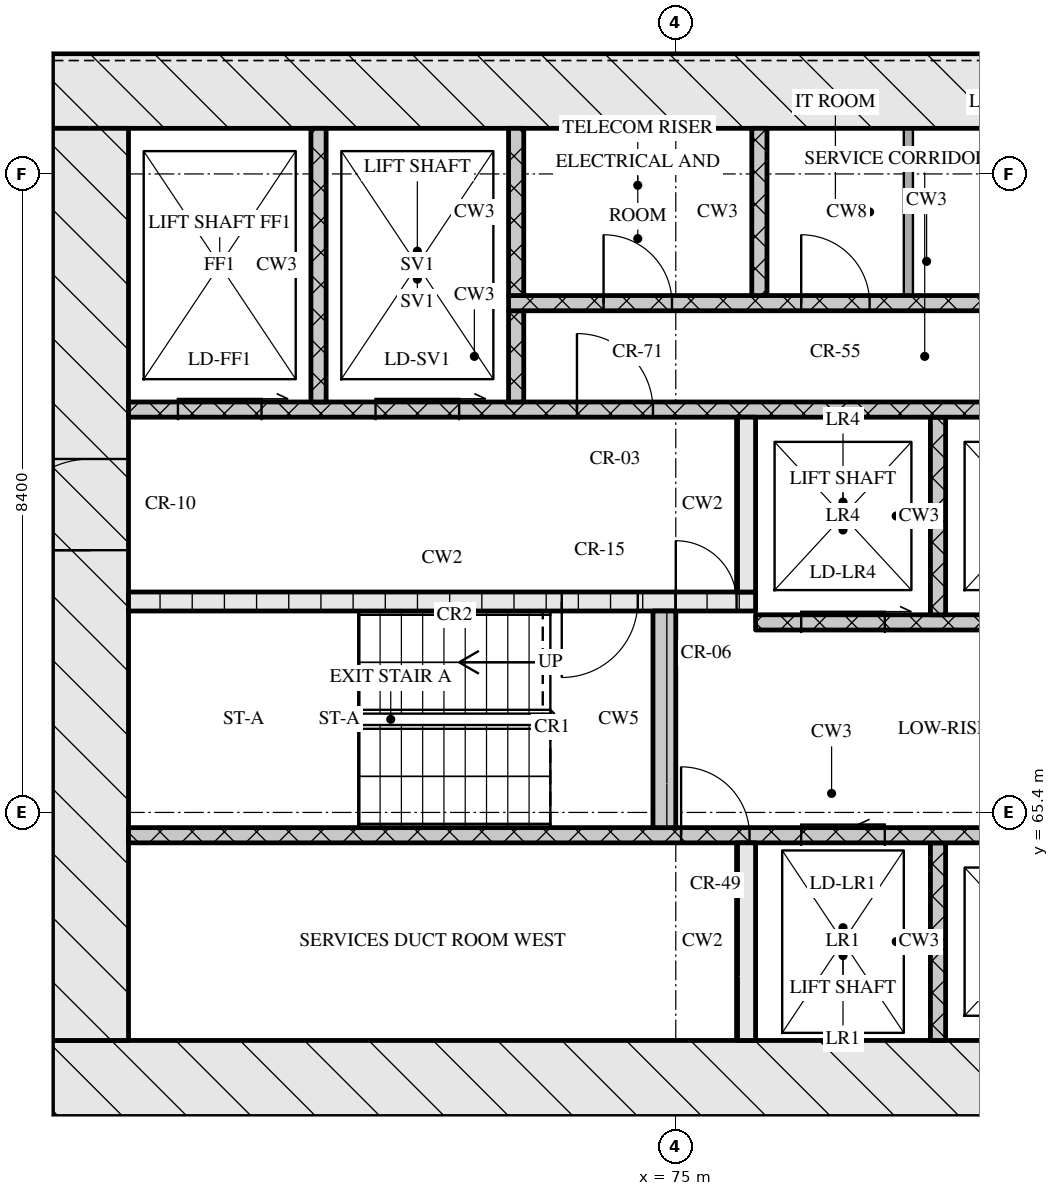
"""IFC4 building model, lengths in metres.
Left out: names, types, materials, properties, quantities, classifications, styles, units other than length and angle.
Written with IfcOpenShell. Run it as: python <this file> out.ifc"""

import sys

from ifc_helpers import new_model, si_unit, direction, frame, frame_2d, origin, place, context, subcontext, project, spatial, rectangle, extrude, element, fill, save


model = new_model("IFC4")
c1 = context("Model", 3, precision=1e-05, world=origin(), true_north=direction((0.0, 1.0)))
c2 = subcontext(c1, "Body", "Model", "MODEL_VIEW")
j1 = project(units=[si_unit("LENGTHUNIT", "METRE"), si_unit("PLANEANGLEUNIT", "RADIAN")], contexts=[c1])
p1 = place(None, origin())
s1 = spatial("IfcSite", under=j1, at=p1, CompositionType="ELEMENT")
p2 = place(p1, origin())
s2 = spatial("IfcBuilding", under=s1, at=p2, CompositionType="ELEMENT")
p3 = place(p2, frame((0.0, 0.0, 138.45)))
s3 = spatial("IfcBuildingStorey", under=s2, at=p3, CompositionType="ELEMENT", Elevation=138.45)
p4 = place(p3, frame((66.8, 61.9, 0.0), z_axis=(0.0, 0.0, 1.0), x_axis=(1.0, 0.0, 0.0)))
e1 = element("IfcWall", 1, at=p4, inside=s3, PredefinedType="SOLIDWALL", context=c2, shape_type="SweptSolid", body=[
    extrude(rectangle(XDim=41.6, YDim=1.0, at=frame_2d((20.8, 0.0))), origin(), (0.0, 0.0, 1.0), 3.3),
])
p5 = place(p4, frame((21.15, 0.0, 0.0)))
e2 = element("IfcOpeningElement", 2, at=p5, cuts=e1, PredefinedType="OPENING", context=c2, shape_type="SweptSolid", body=[
    extrude(rectangle(XDim=1.8, YDim=2.1, at=frame_2d((0.9, 1.05))), frame((0.0, 0.51, 0.0), z_axis=(0.0, -1.0, 0.0), x_axis=(1.0, 0.0, 0.0)), (0.0, 0.0, 1.0), 1.02),
])
p6 = place(p3, frame((66.8, 74.9, 0.0), z_axis=(0.0, 0.0, 1.0), x_axis=(1.0, 0.0, 0.0)))
e3 = element("IfcWall", 3, at=p6, inside=s3, PredefinedType="SOLIDWALL", context=c2, shape_type="SweptSolid", body=[
    extrude(rectangle(XDim=41.6, YDim=1.0, at=frame_2d((20.8, 0.0))), origin(), (0.0, 0.0, 1.0), 3.3),
])
p7 = place(p3, frame((67.3, 62.4, 0.0), z_axis=(0.0, 0.0, 1.0), x_axis=(0.0, 1.0, 0.0)))
e4 = element("IfcWall", 4, at=p7, inside=s3, PredefinedType="SOLIDWALL", context=c2, shape_type="SweptSolid", body=[
    extrude(rectangle(XDim=12.0, YDim=1.0, at=frame_2d((6.0, 0.0))), origin(), (0.0, 0.0, 1.0), 3.3),
])
p8 = place(p7, frame((6.45, 0.0, 0.0)))
e5 = element("IfcOpeningElement", 5, at=p8, cuts=e4, PredefinedType="OPENING", context=c2, shape_type="SweptSolid", body=[
    extrude(rectangle(XDim=1.2, YDim=2.1, at=frame_2d((0.6, 1.05))), frame((0.0, 0.51, 0.0), z_axis=(0.0, -1.0, 0.0), x_axis=(1.0, 0.0, 0.0)), (0.0, 0.0, 1.0), 1.02),
])
p9 = place(p3, frame((75.925, 62.4, 0.0), z_axis=(0.0, 0.0, 1.0), x_axis=(0.0, 1.0, 0.0)))
e6 = element("IfcWall", 6, at=p9, inside=s3, PredefinedType="SOLIDWALL", context=c2, shape_type="SweptSolid", body=[
    extrude(rectangle(XDim=2.6, YDim=0.25, at=frame_2d((1.3, 0.0))), origin(), (0.0, 0.0, 1.0), 3.3),
])
p10 = place(p3, frame((78.45, 62.4, 0.0), z_axis=(0.0, 0.0, 1.0), x_axis=(0.0, 1.0, 0.0)))
e7 = element("IfcWall", 7, at=p10, inside=s3, PredefinedType="SOLIDWALL", context=c2, shape_type="SweptSolid", body=[
    extrude(rectangle(XDim=2.6, YDim=0.2, at=frame_2d((1.3, 0.0))), origin(), (0.0, 0.0, 1.0), 3.3),
])
p11 = place(p3, frame((67.8, 65.1, 0.0), z_axis=(0.0, 0.0, 1.0), x_axis=(1.0, 0.0, 0.0)))
e8 = element("IfcWall", 8, at=p11, inside=s3, PredefinedType="SOLIDWALL", context=c2, shape_type="SweptSolid", body=[
    extrude(rectangle(XDim=18.5, YDim=0.2, at=frame_2d((9.25, 0.0))), origin(), (0.0, 0.0, 1.0), 3.3),
])
p12 = place(p11, frame((7.27, 0.0, 0.0)))
e9 = element("IfcOpeningElement", 9, at=p12, cuts=e8, PredefinedType="OPENING", context=c2, shape_type="SweptSolid", body=[
    extrude(rectangle(XDim=0.9, YDim=2.1, at=frame_2d((0.45, 1.05))), frame((0.0, 0.11, 0.0), z_axis=(0.0, -1.0, 0.0), x_axis=(1.0, 0.0, 0.0)), (0.0, 0.0, 1.0), 0.22),
])
p13 = place(p11, frame((8.85, 0.0, 0.0)))
e10 = element("IfcOpeningElement", 10, at=p13, cuts=e8, PredefinedType="OPENING", context=c2, shape_type="SweptSolid", body=[
    extrude(rectangle(XDim=1.1, YDim=2.1, at=frame_2d((0.55, 1.05))), frame((0.0, 0.11, 0.0), z_axis=(0.0, -1.0, 0.0), x_axis=(1.0, 0.0, 0.0)), (0.0, 0.0, 1.0), 0.22),
])
p14 = place(p11, frame((11.35, 0.0, 0.0)))
e11 = element("IfcOpeningElement", 11, at=p14, cuts=e8, PredefinedType="OPENING", context=c2, shape_type="SweptSolid", body=[
    extrude(rectangle(XDim=1.1, YDim=2.1, at=frame_2d((0.55, 1.05))), frame((0.0, 0.11, 0.0), z_axis=(0.0, -1.0, 0.0), x_axis=(1.0, 0.0, 0.0)), (0.0, 0.0, 1.0), 0.22),
])
p15 = place(p11, frame((13.85, 0.0, 0.0)))
e12 = element("IfcOpeningElement", 12, at=p15, cuts=e8, PredefinedType="OPENING", context=c2, shape_type="SweptSolid", body=[
    extrude(rectangle(XDim=1.1, YDim=2.1, at=frame_2d((0.55, 1.05))), frame((0.0, 0.11, 0.0), z_axis=(0.0, -1.0, 0.0), x_axis=(1.0, 0.0, 0.0)), (0.0, 0.0, 1.0), 0.22),
])
p16 = place(p11, frame((16.7, 0.0, 0.0)))
e13 = element("IfcOpeningElement", 13, at=p16, cuts=e8, PredefinedType="OPENING", context=c2, shape_type="SweptSolid", body=[
    extrude(rectangle(XDim=0.9, YDim=2.1, at=frame_2d((0.45, 1.05))), frame((0.0, 0.11, 0.0), z_axis=(0.0, -1.0, 0.0), x_axis=(1.0, 0.0, 0.0)), (0.0, 0.0, 1.0), 0.22),
])
p17 = place(p3, frame((74.85, 65.2, 0.0), z_axis=(0.0, 0.0, 1.0), x_axis=(0.0, 1.0, 0.0)))
e14 = element("IfcWall", 14, at=p17, inside=s3, PredefinedType="SOLIDWALL", context=c2, shape_type="SweptSolid", body=[
    extrude(rectangle(XDim=2.85, YDim=0.3, at=frame_2d((1.425, 0.0))), origin(), (0.0, 0.0, 1.0), 3.3),
])
p18 = place(p3, frame((76.05, 67.9, 0.0), z_axis=(0.0, 0.0, 1.0), x_axis=(1.0, 0.0, 0.0)))
e15 = element("IfcWall", 15, at=p18, inside=s3, PredefinedType="SOLIDWALL", context=c2, shape_type="SweptSolid", body=[
    extrude(rectangle(XDim=23.1, YDim=0.2, at=frame_2d((11.55, 0.0))), origin(), (0.0, 0.0, 1.0), 3.3),
])
p19 = place(p18, frame((0.6, 0.0, 0.0)))
e16 = element("IfcOpeningElement", 16, at=p19, cuts=e15, PredefinedType="OPENING", context=c2, shape_type="SweptSolid", body=[
    extrude(rectangle(XDim=1.1, YDim=2.1, at=frame_2d((0.55, 1.05))), frame((0.0, 0.11, 0.0), z_axis=(0.0, -1.0, 0.0), x_axis=(1.0, 0.0, 0.0)), (0.0, 0.0, 1.0), 0.22),
])
p20 = place(p18, frame((3.1, 0.0, 0.0)))
e17 = element("IfcOpeningElement", 17, at=p20, cuts=e15, PredefinedType="OPENING", context=c2, shape_type="SweptSolid", body=[
    extrude(rectangle(XDim=1.1, YDim=2.1, at=frame_2d((0.55, 1.05))), frame((0.0, 0.11, 0.0), z_axis=(0.0, -1.0, 0.0), x_axis=(1.0, 0.0, 0.0)), (0.0, 0.0, 1.0), 0.22),
])
p21 = place(p18, frame((5.6, 0.0, 0.0)))
e18 = element("IfcOpeningElement", 18, at=p21, cuts=e15, PredefinedType="OPENING", context=c2, shape_type="SweptSolid", body=[
    extrude(rectangle(XDim=1.1, YDim=2.1, at=frame_2d((0.55, 1.05))), frame((0.0, 0.11, 0.0), z_axis=(0.0, -1.0, 0.0), x_axis=(1.0, 0.0, 0.0)), (0.0, 0.0, 1.0), 0.22),
])
p22 = place(p18, frame((9.7, 0.0, 0.0)))
e19 = element("IfcOpeningElement", 19, at=p22, cuts=e15, PredefinedType="OPENING", context=c2, shape_type="SweptSolid", body=[
    extrude(rectangle(XDim=0.9, YDim=2.1, at=frame_2d((0.45, 1.05))), frame((0.0, 0.11, 0.0), z_axis=(0.0, -1.0, 0.0), x_axis=(1.0, 0.0, 0.0)), (0.0, 0.0, 1.0), 0.22),
])
p23 = place(p18, frame((13.55, 0.0, 0.0)))
e20 = element("IfcOpeningElement", 20, at=p23, cuts=e15, PredefinedType="OPENING", context=c2, shape_type="SweptSolid", body=[
    extrude(rectangle(XDim=1.0, YDim=2.1, at=frame_2d((0.5, 1.05))), frame((0.0, 0.11, 0.0), z_axis=(0.0, -1.0, 0.0), x_axis=(1.0, 0.0, 0.0)), (0.0, 0.0, 1.0), 0.22),
])
p24 = place(p3, frame((78.45, 68.0, 0.0), z_axis=(0.0, 0.0, 1.0), x_axis=(0.0, 1.0, 0.0)))
e21 = element("IfcWall", 21, at=p24, inside=s3, PredefinedType="SOLIDWALL", context=c2, shape_type="SweptSolid", body=[
    extrude(rectangle(XDim=2.6, YDim=0.2, at=frame_2d((1.3, 0.0))), origin(), (0.0, 0.0, 1.0), 3.3),
])
p25 = place(p3, frame((67.8, 68.175, 0.0), z_axis=(0.0, 0.0, 1.0), x_axis=(1.0, 0.0, 0.0)))
e22 = element("IfcWall", 22, at=p25, inside=s3, PredefinedType="SOLIDWALL", context=c2, shape_type="SweptSolid", body=[
    extrude(rectangle(XDim=8.25, YDim=0.25, at=frame_2d((4.125, 0.0))), origin(), (0.0, 0.0, 1.0), 3.3),
])
p26 = place(p25, frame((5.7, 0.0, 0.0)))
e23 = element("IfcOpeningElement", 23, at=p26, cuts=e22, PredefinedType="OPENING", context=c2, shape_type="SweptSolid", body=[
    extrude(rectangle(XDim=1.0, YDim=2.1, at=frame_2d((0.5, 1.05))), frame((0.0, 0.135, 0.0), z_axis=(0.0, -1.0, 0.0), x_axis=(1.0, 0.0, 0.0)), (0.0, 0.0, 1.0), 0.27),
])
p27 = place(p25, frame((7.2, 0.0, 0.0)))
e24 = element("IfcOpeningElement", 24, at=p27, cuts=e22, PredefinedType="OPENING", context=c2, shape_type="SweptSolid", body=[
    extrude(rectangle(XDim=0.8, YDim=2.1, at=frame_2d((0.4, 1.05))), frame((0.0, 0.135, 0.0), z_axis=(0.0, -1.0, 0.0), x_axis=(1.0, 0.0, 0.0)), (0.0, 0.0, 1.0), 0.27),
])
p28 = place(p3, frame((75.925, 68.3, 0.0), z_axis=(0.0, 0.0, 1.0), x_axis=(0.0, 1.0, 0.0)))
e25 = element("IfcWall", 25, at=p28, inside=s3, PredefinedType="SOLIDWALL", context=c2, shape_type="SweptSolid", body=[
    extrude(rectangle(XDim=2.3, YDim=0.25, at=frame_2d((1.15, 0.0))), origin(), (0.0, 0.0, 1.0), 3.3),
])
p29 = place(p3, frame((67.8, 70.7, 0.0), z_axis=(0.0, 0.0, 1.0), x_axis=(1.0, 0.0, 0.0)))
e26 = element("IfcWall", 26, at=p29, inside=s3, PredefinedType="SOLIDWALL", context=c2, shape_type="SweptSolid", body=[
    extrude(rectangle(XDim=39.6, YDim=0.2, at=frame_2d((19.8, 0.0))), origin(), (0.0, 0.0, 1.0), 3.3),
])
p30 = place(p29, frame((0.65, 0.0, 0.0)))
e27 = element("IfcOpeningElement", 27, at=p30, cuts=e26, PredefinedType="OPENING", context=c2, shape_type="SweptSolid", body=[
    extrude(rectangle(XDim=1.1, YDim=2.1, at=frame_2d((0.55, 1.05))), frame((0.0, 0.11, 0.0), z_axis=(0.0, -1.0, 0.0), x_axis=(1.0, 0.0, 0.0)), (0.0, 0.0, 1.0), 0.22),
])
p31 = place(p29, frame((3.25, 0.0, 0.0)))
e28 = element("IfcOpeningElement", 28, at=p31, cuts=e26, PredefinedType="OPENING", context=c2, shape_type="SweptSolid", body=[
    extrude(rectangle(XDim=1.1, YDim=2.1, at=frame_2d((0.55, 1.05))), frame((0.0, 0.11, 0.0), z_axis=(0.0, -1.0, 0.0), x_axis=(1.0, 0.0, 0.0)), (0.0, 0.0, 1.0), 0.22),
])
p32 = place(p29, frame((5.9, 0.0, 0.0)))
e29 = element("IfcOpeningElement", 29, at=p32, cuts=e26, PredefinedType="OPENING", context=c2, shape_type="SweptSolid", body=[
    extrude(rectangle(XDim=1.0, YDim=2.1, at=frame_2d((0.5, 1.05))), frame((0.0, 0.11, 0.0), z_axis=(0.0, -1.0, 0.0), x_axis=(1.0, 0.0, 0.0)), (0.0, 0.0, 1.0), 0.22),
])
p33 = place(p29, frame((21.7, 0.0, 0.0)))
e30 = element("IfcOpeningElement", 30, at=p33, cuts=e26, PredefinedType="OPENING", context=c2, shape_type="SweptSolid", body=[
    extrude(rectangle(XDim=1.0, YDim=2.1, at=frame_2d((0.5, 1.05))), frame((0.0, 0.11, 0.0), z_axis=(0.0, -1.0, 0.0), x_axis=(1.0, 0.0, 0.0)), (0.0, 0.0, 1.0), 0.22),
])
p34 = place(p29, frame((32.7, 0.0, 0.0)))
e31 = element("IfcOpeningElement", 31, at=p34, cuts=e26, PredefinedType="OPENING", context=c2, shape_type="SweptSolid", body=[
    extrude(rectangle(XDim=1.0, YDim=2.1, at=frame_2d((0.5, 1.05))), frame((0.0, 0.11, 0.0), z_axis=(0.0, -1.0, 0.0), x_axis=(1.0, 0.0, 0.0)), (0.0, 0.0, 1.0), 0.22),
])
p35 = place(p29, frame((35.25, 0.0, 0.0)))
e32 = element("IfcOpeningElement", 32, at=p35, cuts=e26, PredefinedType="OPENING", context=c2, shape_type="SweptSolid", body=[
    extrude(rectangle(XDim=1.1, YDim=2.1, at=frame_2d((0.55, 1.05))), frame((0.0, 0.11, 0.0), z_axis=(0.0, -1.0, 0.0), x_axis=(1.0, 0.0, 0.0)), (0.0, 0.0, 1.0), 0.22),
])
p36 = place(p29, frame((37.85, 0.0, 0.0)))
e33 = element("IfcOpeningElement", 33, at=p36, cuts=e26, PredefinedType="OPENING", context=c2, shape_type="SweptSolid", body=[
    extrude(rectangle(XDim=1.1, YDim=2.1, at=frame_2d((0.55, 1.05))), frame((0.0, 0.11, 0.0), z_axis=(0.0, -1.0, 0.0), x_axis=(1.0, 0.0, 0.0)), (0.0, 0.0, 1.0), 0.22),
])
p37 = place(p3, frame((70.3, 70.8, 0.0), z_axis=(0.0, 0.0, 1.0), x_axis=(0.0, 1.0, 0.0)))
e34 = element("IfcWall", 34, at=p37, inside=s3, PredefinedType="SOLIDWALL", context=c2, shape_type="SweptSolid", body=[
    extrude(rectangle(XDim=3.6, YDim=0.2, at=frame_2d((1.8, 0.0))), origin(), (0.0, 0.0, 1.0), 3.3),
])
p38 = place(p3, frame((72.9, 70.8, 0.0), z_axis=(0.0, 0.0, 1.0), x_axis=(0.0, 1.0, 0.0)))
e35 = element("IfcWall", 35, at=p38, inside=s3, PredefinedType="SOLIDWALL", context=c2, shape_type="SweptSolid", body=[
    extrude(rectangle(XDim=1.2, YDim=0.2, at=frame_2d((0.6, 0.0))), origin(), (0.0, 0.0, 1.0), 3.3),
])
p39 = place(p3, frame((72.8, 72.1, 0.0), z_axis=(0.0, 0.0, 1.0), x_axis=(1.0, 0.0, 0.0)))
e36 = element("IfcWall", 36, at=p39, inside=s3, PredefinedType="SOLIDWALL", context=c2, shape_type="SweptSolid", body=[
    extrude(rectangle(XDim=11.0, YDim=0.2, at=frame_2d((5.5, 0.0))), origin(), (0.0, 0.0, 1.0), 3.3),
])
p40 = place(p39, frame((1.25, 0.0, 0.0)))
e37 = element("IfcOpeningElement", 37, at=p40, cuts=e36, PredefinedType="OPENING", context=c2, shape_type="SweptSolid", body=[
    extrude(rectangle(XDim=0.9, YDim=2.1, at=frame_2d((0.45, 1.05))), frame((0.0, 0.11, 0.0), z_axis=(0.0, -1.0, 0.0), x_axis=(1.0, 0.0, 0.0)), (0.0, 0.0, 1.0), 0.22),
])
p41 = place(p39, frame((3.85, 0.0, 0.0)))
e38 = element("IfcOpeningElement", 38, at=p41, cuts=e36, PredefinedType="OPENING", context=c2, shape_type="SweptSolid", body=[
    extrude(rectangle(XDim=0.9, YDim=2.1, at=frame_2d((0.45, 1.05))), frame((0.0, 0.11, 0.0), z_axis=(0.0, -1.0, 0.0), x_axis=(1.0, 0.0, 0.0)), (0.0, 0.0, 1.0), 0.22),
])
p42 = place(p39, frame((6.42, 0.0, 0.0)))
e39 = element("IfcOpeningElement", 39, at=p42, cuts=e36, PredefinedType="OPENING", context=c2, shape_type="SweptSolid", body=[
    extrude(rectangle(XDim=0.9, YDim=2.1, at=frame_2d((0.45, 1.05))), frame((0.0, 0.11, 0.0), z_axis=(0.0, -1.0, 0.0), x_axis=(1.0, 0.0, 0.0)), (0.0, 0.0, 1.0), 0.22),
])
p43 = place(p39, frame((9.195, 0.0, 0.0)))
e40 = element("IfcOpeningElement", 40, at=p43, cuts=e36, PredefinedType="OPENING", context=c2, shape_type="SweptSolid", body=[
    extrude(rectangle(XDim=0.9, YDim=2.1, at=frame_2d((0.45, 1.05))), frame((0.0, 0.11, 0.0), z_axis=(0.0, -1.0, 0.0), x_axis=(1.0, 0.0, 0.0)), (0.0, 0.0, 1.0), 0.22),
])
for number, where, z_axis, x_axis in (
    (41, (72.9, 72.2, 0.0), (0.0, 0.0, 1.0), (0.0, 1.0, 0.0)),
    (42, (76.1, 72.2, 0.0), (0.0, 0.0, 1.0), (0.0, 1.0, 0.0)),
):
    element("IfcWall", number, at=place(p3, frame(where, z_axis=z_axis, x_axis=x_axis)), inside=s3, PredefinedType="SOLIDWALL", context=c2, shape_type="SweptSolid", body=[
        extrude(rectangle(XDim=2.2, YDim=0.2, at=frame_2d((1.1, 0.0))), origin(), (0.0, 0.0, 1.0), 3.3),
    ])
p44 = place(p3, frame((78.06, 72.2, 0.0), z_axis=(0.0, 0.0, 1.0), x_axis=(0.0, 1.0, 0.0)))
e43 = element("IfcWall", 43, at=p44, inside=s3, PredefinedType="PARTITIONING", context=c2, shape_type="SweptSolid", body=[
    extrude(rectangle(XDim=2.2, YDim=0.12, at=frame_2d((1.1, 0.0))), origin(), (0.0, 0.0, 1.0), 3.3),
])
p45 = place(p12, origin())
e44 = element("IfcDoor", 44, at=p45, inside=s3, OperationType="SINGLE_SWING_LEFT", PredefinedType="DOOR", context=c2, shape_type="SweptSolid", body=[
    extrude(rectangle(XDim=0.9, YDim=2.1, at=frame_2d((0.45, 1.05))), frame((0.0, 0.025, 0.0), z_axis=(0.0, -1.0, 0.0), x_axis=(1.0, 0.0, 0.0)), (0.0, 0.0, 1.0), 0.05),
])
fill(e9, e44)
p46 = place(p13, origin())
e45 = element("IfcDoor", 45, at=p46, inside=s3, OperationType="SLIDING_TO_LEFT", PredefinedType="DOOR", context=c2, shape_type="SweptSolid", body=[
    extrude(rectangle(XDim=1.1, YDim=2.1, at=frame_2d((0.55, 1.05))), frame((0.0, 0.025, 0.0), z_axis=(0.0, -1.0, 0.0), x_axis=(1.0, 0.0, 0.0)), (0.0, 0.0, 1.0), 0.05),
])
fill(e10, e45)
p47 = place(p19, origin())
e46 = element("IfcDoor", 46, at=p47, inside=s3, OperationType="SLIDING_TO_RIGHT", PredefinedType="DOOR", context=c2, shape_type="SweptSolid", body=[
    extrude(rectangle(XDim=1.1, YDim=2.1, at=frame_2d((0.55, 1.05))), frame((0.0, 0.025, 0.0), z_axis=(0.0, -1.0, 0.0), x_axis=(1.0, 0.0, 0.0)), (0.0, 0.0, 1.0), 0.05),
])
fill(e16, e46)
p48 = place(p26, origin())
e47 = element("IfcDoor", 47, at=p48, inside=s3, OperationType="SINGLE_SWING_RIGHT", PredefinedType="DOOR", context=c2, shape_type="SweptSolid", body=[
    extrude(rectangle(XDim=1.0, YDim=2.1, at=frame_2d((0.5, 1.05))), frame((0.0, 0.025, 0.0), z_axis=(0.0, -1.0, 0.0), x_axis=(1.0, 0.0, 0.0)), (0.0, 0.0, 1.0), 0.05),
])
fill(e23, e47)
p49 = place(p27, origin())
e48 = element("IfcDoor", 48, at=p49, inside=s3, OperationType="SINGLE_SWING_LEFT", PredefinedType="DOOR", context=c2, shape_type="SweptSolid", body=[
    extrude(rectangle(XDim=0.8, YDim=2.1, at=frame_2d((0.4, 1.05))), frame((0.0, 0.025, 0.0), z_axis=(0.0, -1.0, 0.0), x_axis=(1.0, 0.0, 0.0)), (0.0, 0.0, 1.0), 0.05),
])
fill(e24, e48)
p50 = place(p8, origin())
e49 = element("IfcDoor", 49, at=p50, inside=s3, OperationType="SINGLE_SWING_LEFT", PredefinedType="DOOR", context=c2, shape_type="SweptSolid", body=[
    extrude(rectangle(XDim=1.2, YDim=2.1, at=frame_2d((0.6, 1.05))), frame((0.0, 0.025, 0.0), z_axis=(0.0, -1.0, 0.0), x_axis=(1.0, 0.0, 0.0)), (0.0, 0.0, 1.0), 0.05),
])
fill(e5, e49)
p51 = place(p30, origin())
e50 = element("IfcDoor", 50, at=p51, inside=s3, OperationType="SLIDING_TO_RIGHT", PredefinedType="DOOR", context=c2, shape_type="SweptSolid", body=[
    extrude(rectangle(XDim=1.1, YDim=2.1, at=frame_2d((0.55, 1.05))), frame((0.0, 0.025, 0.0), z_axis=(0.0, -1.0, 0.0), x_axis=(1.0, 0.0, 0.0)), (0.0, 0.0, 1.0), 0.05),
])
fill(e27, e50)
p52 = place(p31, origin())
e51 = element("IfcDoor", 51, at=p52, inside=s3, OperationType="SLIDING_TO_RIGHT", PredefinedType="DOOR", context=c2, shape_type="SweptSolid", body=[
    extrude(rectangle(XDim=1.1, YDim=2.1, at=frame_2d((0.55, 1.05))), frame((0.0, 0.025, 0.0), z_axis=(0.0, -1.0, 0.0), x_axis=(1.0, 0.0, 0.0)), (0.0, 0.0, 1.0), 0.05),
])
fill(e28, e51)
p53 = place(p32, origin())
e52 = element("IfcDoor", 52, at=p53, inside=s3, OperationType="SINGLE_SWING_LEFT", PredefinedType="DOOR", context=c2, shape_type="SweptSolid", body=[
    extrude(rectangle(XDim=1.0, YDim=2.1, at=frame_2d((0.5, 1.05))), frame((0.0, 0.025, 0.0), z_axis=(0.0, -1.0, 0.0), x_axis=(1.0, 0.0, 0.0)), (0.0, 0.0, 1.0), 0.05),
])
fill(e29, e52)
p54 = place(p40, origin())
e53 = element("IfcDoor", 53, at=p54, inside=s3, OperationType="SINGLE_SWING_LEFT", PredefinedType="DOOR", context=c2, shape_type="SweptSolid", body=[
    extrude(rectangle(XDim=0.9, YDim=2.1, at=frame_2d((0.45, 1.05))), frame((0.0, 0.025, 0.0), z_axis=(0.0, -1.0, 0.0), x_axis=(1.0, 0.0, 0.0)), (0.0, 0.0, 1.0), 0.05),
])
fill(e37, e53)
p55 = place(p41, origin())
e54 = element("IfcDoor", 54, at=p55, inside=s3, OperationType="SINGLE_SWING_LEFT", PredefinedType="DOOR", context=c2, shape_type="SweptSolid", body=[
    extrude(rectangle(XDim=0.9, YDim=2.1, at=frame_2d((0.45, 1.05))), frame((0.0, 0.025, 0.0), z_axis=(0.0, -1.0, 0.0), x_axis=(1.0, 0.0, 0.0)), (0.0, 0.0, 1.0), 0.05),
])
fill(e38, e54)
save(model, sys.argv[1])
